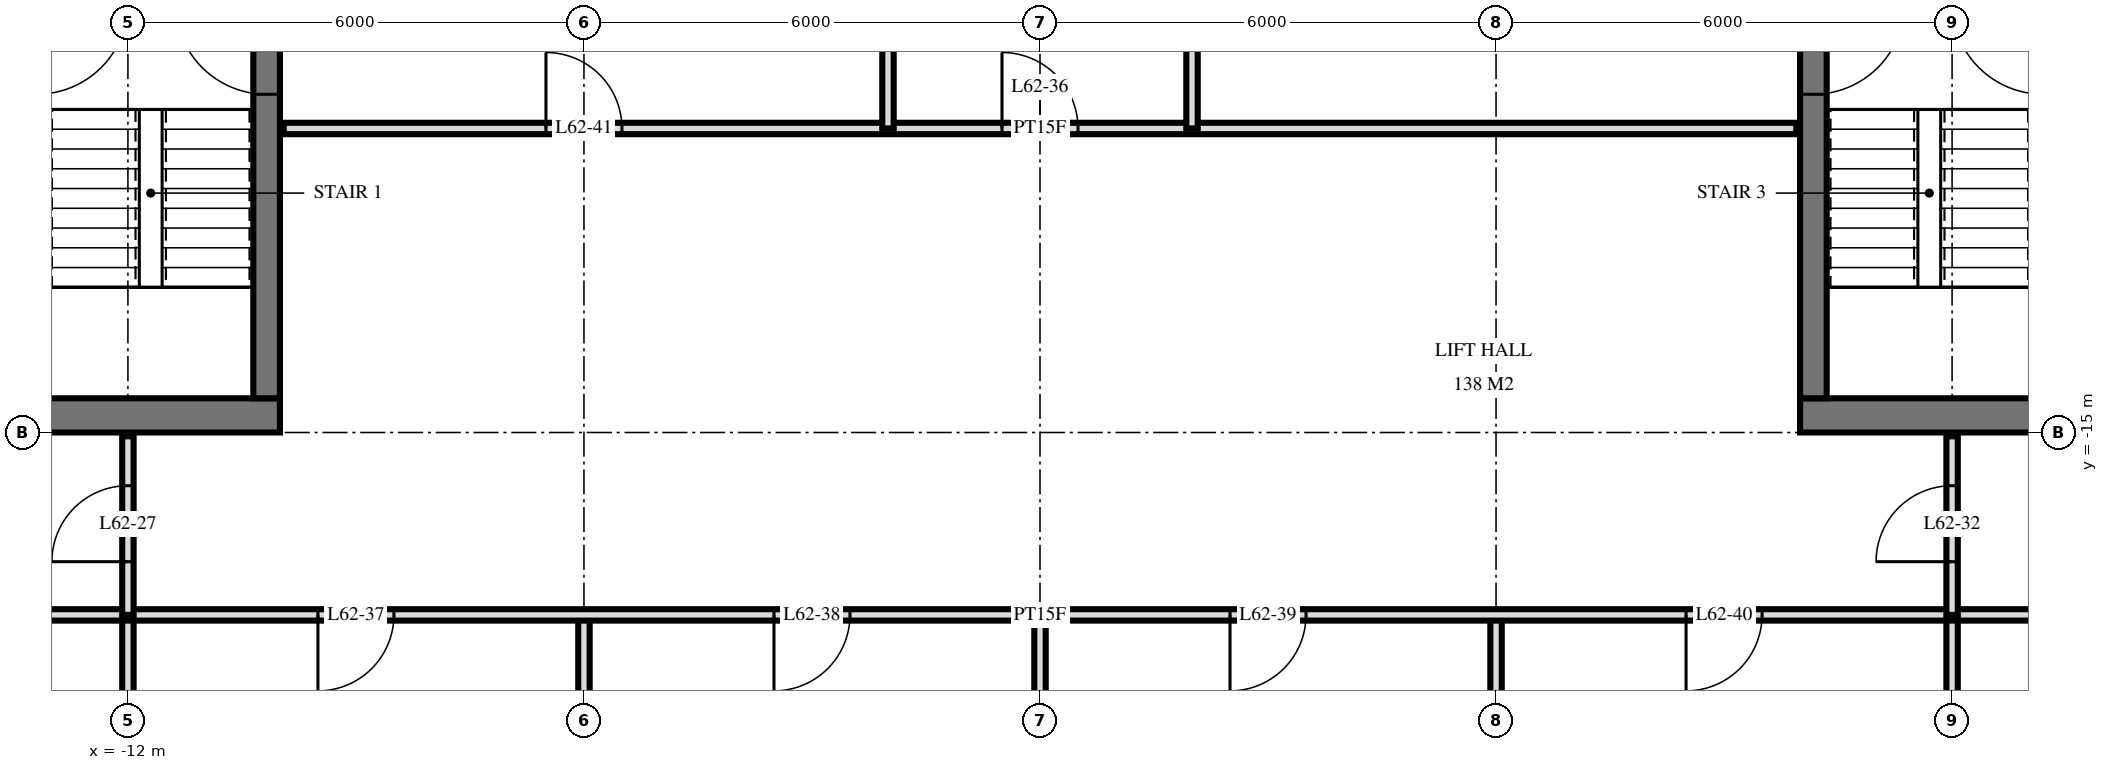
"""IFC4 building model, lengths in metres.
Left out: names, types, materials, properties, quantities, classifications, styles, units other than length and angle.
Written with IfcOpenShell. Run it as: python <this file> out.ifc"""

import sys

from ifc_helpers import new_model, si_unit, direction, frame, frame_2d, origin, place, context, subcontext, project, spatial, rectangle, extrude, element, fill, save


model = new_model("IFC4")
c1 = context("Model", 3, precision=1e-05, world=origin(), true_north=direction((0.0, 1.0)))
c2 = subcontext(c1, "Body", "Model", "MODEL_VIEW")
j1 = project(units=[si_unit("LENGTHUNIT", "METRE"), si_unit("PLANEANGLEUNIT", "RADIAN")], contexts=[c1])
p1 = place(None, origin())
s1 = spatial("IfcSite", under=j1, at=p1, CompositionType="ELEMENT")
p2 = place(p1, origin())
s2 = spatial("IfcBuilding", under=s1, at=p2, CompositionType="ELEMENT")
p3 = place(p2, frame((0.0, 0.0, 236.1)))
s3 = spatial("IfcBuildingStorey", under=s2, at=p3, CompositionType="ELEMENT", Elevation=236.1)
p4 = place(p3, frame((-24.5, -14.775, 0.0), z_axis=(0.0, 0.0, 1.0), x_axis=(1.0, 0.0, 0.0)))
e1 = element("IfcWall", 1, at=p4, inside=s3, PredefinedType="SHEAR", context=c2, shape_type="SweptSolid", body=[
    extrude(rectangle(XDim=14.5, YDim=0.45, at=frame_2d((7.25, 0.0))), origin(), (0.0, 0.0, 1.0), 3.5),
])
p5 = place(p4, frame((6.2, 0.0, 0.0)))
e2 = element("IfcOpeningElement", 2, at=p5, cuts=e1, PredefinedType="OPENING", context=c2, shape_type="SweptSolid", body=[
    extrude(rectangle(XDim=1.2, YDim=2.1, at=frame_2d((0.6, 1.05))), frame((0.0, 0.235, 0.0), z_axis=(0.0, -1.0, 0.0), x_axis=(1.0, 0.0, 0.0)), (0.0, 0.0, 1.0), 0.47),
])
p6 = place(p4, frame((9.25, 0.0, 0.0)))
e3 = element("IfcOpeningElement", 3, at=p6, cuts=e1, PredefinedType="OPENING", context=c2, shape_type="SweptSolid", body=[
    extrude(rectangle(XDim=1.1, YDim=2.1, at=frame_2d((0.55, 1.05))), frame((0.0, 0.235, 0.0), z_axis=(0.0, -1.0, 0.0), x_axis=(1.0, 0.0, 0.0)), (0.0, 0.0, 1.0), 0.47),
])
p7 = place(p4, frame((3.5, 0.0, 0.0)))
e4 = element("IfcOpeningElement", 4, at=p7, cuts=e1, PredefinedType="OPENING", context=c2, shape_type="SweptSolid", body=[
    extrude(rectangle(XDim=0.9, YDim=2.1, at=frame_2d((0.45, 1.05))), frame((0.0, 0.235, 0.0), z_axis=(0.0, -1.0, 0.0), x_axis=(1.0, 0.0, 0.0)), (0.0, 0.0, 1.0), 0.47),
])
p8 = place(p4, frame((1.05, 0.0, 0.0)))
e5 = element("IfcOpeningElement", 5, at=p8, cuts=e1, PredefinedType="OPENING", context=c2, shape_type="SweptSolid", body=[
    extrude(rectangle(XDim=1.0, YDim=2.1, at=frame_2d((0.5, 1.05))), frame((0.0, 0.235, 0.0), z_axis=(0.0, -1.0, 0.0), x_axis=(1.0, 0.0, 0.0)), (0.0, 0.0, 1.0), 0.47),
])
p9 = place(p3, frame((-10.175, -14.55, 0.0), z_axis=(0.0, 0.0, 1.0), x_axis=(0.0, 1.0, 0.0)))
e6 = element("IfcWall", 6, at=p9, inside=s3, PredefinedType="SHEAR", context=c2, shape_type="SweptSolid", body=[
    extrude(rectangle(XDim=14.1, YDim=0.35, at=frame_2d((7.05, 0.0))), origin(), (0.0, 0.0, 1.0), 3.5),
])
p10 = place(p9, frame((8.4, 0.0, 0.0)))
e7 = element("IfcOpeningElement", 7, at=p10, cuts=e6, PredefinedType="OPENING", context=c2, shape_type="SweptSolid", body=[
    extrude(rectangle(XDim=1.4, YDim=2.4, at=frame_2d((0.7, 1.2))), frame((0.0, 0.185, 0.0), z_axis=(0.0, -1.0, 0.0), x_axis=(1.0, 0.0, 0.0)), (0.0, 0.0, 1.0), 0.37),
])
p11 = place(p9, frame((10.0, 0.0, 0.0)))
e8 = element("IfcOpeningElement", 8, at=p11, cuts=e6, PredefinedType="OPENING", context=c2, shape_type="SweptSolid", body=[
    extrude(rectangle(XDim=1.4, YDim=2.4, at=frame_2d((0.7, 1.2))), frame((0.0, 0.185, 0.0), z_axis=(0.0, -1.0, 0.0), x_axis=(1.0, 0.0, 0.0)), (0.0, 0.0, 1.0), 0.37),
])
p12 = place(p9, frame((4.0, 0.0, 0.0)))
e9 = element("IfcOpeningElement", 9, at=p12, cuts=e6, PredefinedType="OPENING", context=c2, shape_type="SweptSolid", body=[
    extrude(rectangle(XDim=1.2, YDim=2.1, at=frame_2d((0.6, 1.05))), frame((0.0, 0.185, 0.0), z_axis=(0.0, -1.0, 0.0), x_axis=(1.0, 0.0, 0.0)), (0.0, 0.0, 1.0), 0.37),
])
p13 = place(p3, frame((10.0, -14.775, 0.0), z_axis=(0.0, 0.0, 1.0), x_axis=(1.0, 0.0, 0.0)))
e10 = element("IfcWall", 10, at=p13, inside=s3, PredefinedType="SHEAR", context=c2, shape_type="SweptSolid", body=[
    extrude(rectangle(XDim=14.5, YDim=0.45, at=frame_2d((7.25, 0.0))), origin(), (0.0, 0.0, 1.0), 3.5),
])
p14 = place(p13, frame((7.1, 0.0, 0.0)))
e11 = element("IfcOpeningElement", 11, at=p14, cuts=e10, PredefinedType="OPENING", context=c2, shape_type="SweptSolid", body=[
    extrude(rectangle(XDim=1.2, YDim=2.1, at=frame_2d((0.6, 1.05))), frame((0.0, 0.235, 0.0), z_axis=(0.0, -1.0, 0.0), x_axis=(1.0, 0.0, 0.0)), (0.0, 0.0, 1.0), 0.47),
])
p15 = place(p13, frame((4.15, 0.0, 0.0)))
e12 = element("IfcOpeningElement", 12, at=p15, cuts=e10, PredefinedType="OPENING", context=c2, shape_type="SweptSolid", body=[
    extrude(rectangle(XDim=1.1, YDim=2.1, at=frame_2d((0.55, 1.05))), frame((0.0, 0.235, 0.0), z_axis=(0.0, -1.0, 0.0), x_axis=(1.0, 0.0, 0.0)), (0.0, 0.0, 1.0), 0.47),
])
p16 = place(p13, frame((10.1, 0.0, 0.0)))
e13 = element("IfcOpeningElement", 13, at=p16, cuts=e10, PredefinedType="OPENING", context=c2, shape_type="SweptSolid", body=[
    extrude(rectangle(XDim=0.9, YDim=2.1, at=frame_2d((0.45, 1.05))), frame((0.0, 0.235, 0.0), z_axis=(0.0, -1.0, 0.0), x_axis=(1.0, 0.0, 0.0)), (0.0, 0.0, 1.0), 0.47),
])
p17 = place(p13, frame((12.45, 0.0, 0.0)))
e14 = element("IfcOpeningElement", 14, at=p17, cuts=e10, PredefinedType="OPENING", context=c2, shape_type="SweptSolid", body=[
    extrude(rectangle(XDim=1.0, YDim=2.1, at=frame_2d((0.5, 1.05))), frame((0.0, 0.235, 0.0), z_axis=(0.0, -1.0, 0.0), x_axis=(1.0, 0.0, 0.0)), (0.0, 0.0, 1.0), 0.47),
])
p18 = place(p3, frame((10.175, -14.55, 0.0), z_axis=(0.0, 0.0, 1.0), x_axis=(0.0, 1.0, 0.0)))
e15 = element("IfcWall", 15, at=p18, inside=s3, PredefinedType="SHEAR", context=c2, shape_type="SweptSolid", body=[
    extrude(rectangle(XDim=14.1, YDim=0.35, at=frame_2d((7.05, 0.0))), origin(), (0.0, 0.0, 1.0), 3.5),
])
p19 = place(p18, frame((8.4, 0.0, 0.0)))
e16 = element("IfcOpeningElement", 16, at=p19, cuts=e15, PredefinedType="OPENING", context=c2, shape_type="SweptSolid", body=[
    extrude(rectangle(XDim=1.4, YDim=2.4, at=frame_2d((0.7, 1.2))), frame((0.0, 0.185, 0.0), z_axis=(0.0, -1.0, 0.0), x_axis=(1.0, 0.0, 0.0)), (0.0, 0.0, 1.0), 0.37),
])
p20 = place(p18, frame((10.0, 0.0, 0.0)))
e17 = element("IfcOpeningElement", 17, at=p20, cuts=e15, PredefinedType="OPENING", context=c2, shape_type="SweptSolid", body=[
    extrude(rectangle(XDim=1.4, YDim=2.4, at=frame_2d((0.7, 1.2))), frame((0.0, 0.185, 0.0), z_axis=(0.0, -1.0, 0.0), x_axis=(1.0, 0.0, 0.0)), (0.0, 0.0, 1.0), 0.37),
])
p21 = place(p18, frame((4.0, 0.0, 0.0)))
e18 = element("IfcOpeningElement", 18, at=p21, cuts=e15, PredefinedType="OPENING", context=c2, shape_type="SweptSolid", body=[
    extrude(rectangle(XDim=1.2, YDim=2.1, at=frame_2d((0.6, 1.05))), frame((0.0, 0.185, 0.0), z_axis=(0.0, -1.0, 0.0), x_axis=(1.0, 0.0, 0.0)), (0.0, 0.0, 1.0), 0.37),
])
p22 = place(p3, frame((12.0, -17.4, 0.0), z_axis=(0.0, 0.0, 1.0), x_axis=(0.0, 1.0, 0.0)))
e19 = element("IfcWall", 19, at=p22, inside=s3, PredefinedType="PARTITIONING", context=c2, shape_type="SweptSolid", body=[
    extrude(rectangle(XDim=2.35, YDim=0.15, at=frame_2d((1.175, 0.0))), origin(), (0.0, 0.0, 1.0), 3.22),
])
p23 = place(p22, frame((0.7, 0.0, 0.0)))
e20 = element("IfcOpeningElement", 20, at=p23, cuts=e19, PredefinedType="OPENING", context=c2, shape_type="SweptSolid", body=[
    extrude(rectangle(XDim=1.0, YDim=2.1, at=frame_2d((0.5, 1.05))), frame((0.0, 0.085, 0.0), z_axis=(0.0, -1.0, 0.0), x_axis=(1.0, 0.0, 0.0)), (0.0, 0.0, 1.0), 0.17),
])
for number, where, z_axis, x_axis in (
    (21, (12.0, -29.22, 0.0), (0.0, 0.0, 1.0), (0.0, 1.0, 0.0)),
    (22, (6.0, -29.22, 0.0), (0.0, 0.0, 1.0), (0.0, 1.0, 0.0)),
):
    element("IfcWall", number, at=place(p3, frame(where, z_axis=z_axis, x_axis=x_axis)), inside=s3, PredefinedType="PARTITIONING", context=c2, shape_type="SweptSolid", body=[
        extrude(rectangle(XDim=11.82, YDim=0.15, at=frame_2d((5.91, 0.0))), origin(), (0.0, 0.0, 1.0), 3.22),
    ])
p24 = place(p3, frame((2.0, -11.0, 0.0), z_axis=(0.0, 0.0, 1.0), x_axis=(0.0, 1.0, 0.0)))
e23 = element("IfcWall", 23, at=p24, inside=s3, PredefinedType="PARTITIONING", context=c2, shape_type="SweptSolid", body=[
    extrude(rectangle(XDim=4.0, YDim=0.15, at=frame_2d((2.0, 0.0))), origin(), (0.0, 0.0, 1.0), 3.22),
])
p25 = place(p3, frame((0.0, -29.22, 0.0), z_axis=(0.0, 0.0, 1.0), x_axis=(0.0, 1.0, 0.0)))
e24 = element("IfcWall", 24, at=p25, inside=s3, PredefinedType="PARTITIONING", context=c2, shape_type="SweptSolid", body=[
    extrude(rectangle(XDim=11.82, YDim=0.15, at=frame_2d((5.91, 0.0))), origin(), (0.0, 0.0, 1.0), 3.22),
])
p26 = place(p3, frame((-2.0, -11.0, 0.0), z_axis=(0.0, 0.0, 1.0), x_axis=(0.0, 1.0, 0.0)))
e25 = element("IfcWall", 25, at=p26, inside=s3, PredefinedType="PARTITIONING", context=c2, shape_type="SweptSolid", body=[
    extrude(rectangle(XDim=4.0, YDim=0.15, at=frame_2d((2.0, 0.0))), origin(), (0.0, 0.0, 1.0), 3.22),
])
p27 = place(p3, frame((-6.0, -29.22, 0.0), z_axis=(0.0, 0.0, 1.0), x_axis=(0.0, 1.0, 0.0)))
e26 = element("IfcWall", 26, at=p27, inside=s3, PredefinedType="PARTITIONING", context=c2, shape_type="SweptSolid", body=[
    extrude(rectangle(XDim=11.82, YDim=0.15, at=frame_2d((5.91, 0.0))), origin(), (0.0, 0.0, 1.0), 3.22),
])
p28 = place(p3, frame((-12.0, -17.4, 0.0), z_axis=(0.0, 0.0, 1.0), x_axis=(0.0, 1.0, 0.0)))
e27 = element("IfcWall", 27, at=p28, inside=s3, PredefinedType="PARTITIONING", context=c2, shape_type="SweptSolid", body=[
    extrude(rectangle(XDim=2.35, YDim=0.15, at=frame_2d((1.175, 0.0))), origin(), (0.0, 0.0, 1.0), 3.22),
])
p29 = place(p28, frame((0.7, 0.0, 0.0)))
e28 = element("IfcOpeningElement", 28, at=p29, cuts=e27, PredefinedType="OPENING", context=c2, shape_type="SweptSolid", body=[
    extrude(rectangle(XDim=1.0, YDim=2.1, at=frame_2d((0.5, 1.05))), frame((0.0, 0.085, 0.0), z_axis=(0.0, -1.0, 0.0), x_axis=(1.0, 0.0, 0.0)), (0.0, 0.0, 1.0), 0.17),
])
p30 = place(p3, frame((-12.0, -29.22, 0.0), z_axis=(0.0, 0.0, 1.0), x_axis=(0.0, 1.0, 0.0)))
e29 = element("IfcWall", 29, at=p30, inside=s3, PredefinedType="PARTITIONING", context=c2, shape_type="SweptSolid", body=[
    extrude(rectangle(XDim=11.82, YDim=0.15, at=frame_2d((5.91, 0.0))), origin(), (0.0, 0.0, 1.0), 3.22),
])
p31 = place(p3, frame((-26.82, -17.4, 0.0), z_axis=(0.0, 0.0, 1.0), x_axis=(1.0, 0.0, 0.0)))
e30 = element("IfcWall", 30, at=p31, inside=s3, PredefinedType="PARTITIONING", context=c2, shape_type="SweptSolid", body=[
    extrude(rectangle(XDim=53.64, YDim=0.15, at=frame_2d((26.82, 0.0))), origin(), (0.0, 0.0, 1.0), 3.22),
])
p32 = place(p31, frame((11.97, 0.0, 0.0)))
e31 = element("IfcOpeningElement", 31, at=p32, cuts=e30, PredefinedType="OPENING", context=c2, shape_type="SweptSolid", body=[
    extrude(rectangle(XDim=1.0, YDim=2.1, at=frame_2d((0.5, 1.05))), frame((0.0, 0.085, 0.0), z_axis=(0.0, -1.0, 0.0), x_axis=(1.0, 0.0, 0.0)), (0.0, 0.0, 1.0), 0.17),
])
p33 = place(p31, frame((3.92, 0.0, 0.0)))
e32 = element("IfcOpeningElement", 32, at=p33, cuts=e30, PredefinedType="OPENING", context=c2, shape_type="SweptSolid", body=[
    extrude(rectangle(XDim=1.0, YDim=2.1, at=frame_2d((0.5, 1.05))), frame((0.0, 0.085, 0.0), z_axis=(0.0, -1.0, 0.0), x_axis=(1.0, 0.0, 0.0)), (0.0, 0.0, 1.0), 0.17),
])
p34 = place(p31, frame((5.72, 0.0, 0.0)))
e33 = element("IfcOpeningElement", 33, at=p34, cuts=e30, PredefinedType="OPENING", context=c2, shape_type="SweptSolid", body=[
    extrude(rectangle(XDim=1.0, YDim=2.1, at=frame_2d((0.5, 1.05))), frame((0.0, 0.085, 0.0), z_axis=(0.0, -1.0, 0.0), x_axis=(1.0, 0.0, 0.0)), (0.0, 0.0, 1.0), 0.17),
])
p35 = place(p31, frame((47.72, 0.0, 0.0)))
e34 = element("IfcOpeningElement", 34, at=p35, cuts=e30, PredefinedType="OPENING", context=c2, shape_type="SweptSolid", body=[
    extrude(rectangle(XDim=1.0, YDim=2.1, at=frame_2d((0.5, 1.05))), frame((0.0, 0.085, 0.0), z_axis=(0.0, -1.0, 0.0), x_axis=(1.0, 0.0, 0.0)), (0.0, 0.0, 1.0), 0.17),
])
p36 = place(p31, frame((51.02, 0.0, 0.0)))
e35 = element("IfcOpeningElement", 35, at=p36, cuts=e30, PredefinedType="OPENING", context=c2, shape_type="SweptSolid", body=[
    extrude(rectangle(XDim=1.0, YDim=2.1, at=frame_2d((0.5, 1.05))), frame((0.0, 0.085, 0.0), z_axis=(0.0, -1.0, 0.0), x_axis=(1.0, 0.0, 0.0)), (0.0, 0.0, 1.0), 0.17),
])
p37 = place(p31, frame((17.32, 0.0, 0.0)))
e36 = element("IfcOpeningElement", 36, at=p37, cuts=e30, PredefinedType="OPENING", context=c2, shape_type="SweptSolid", body=[
    extrude(rectangle(XDim=1.0, YDim=2.1, at=frame_2d((0.5, 1.05))), frame((0.0, 0.085, 0.0), z_axis=(0.0, -1.0, 0.0), x_axis=(1.0, 0.0, 0.0)), (0.0, 0.0, 1.0), 0.17),
])
p38 = place(p31, frame((23.32, 0.0, 0.0)))
e37 = element("IfcOpeningElement", 37, at=p38, cuts=e30, PredefinedType="OPENING", context=c2, shape_type="SweptSolid", body=[
    extrude(rectangle(XDim=1.0, YDim=2.1, at=frame_2d((0.5, 1.05))), frame((0.0, 0.085, 0.0), z_axis=(0.0, -1.0, 0.0), x_axis=(1.0, 0.0, 0.0)), (0.0, 0.0, 1.0), 0.17),
])
p39 = place(p31, frame((29.32, 0.0, 0.0)))
e38 = element("IfcOpeningElement", 38, at=p39, cuts=e30, PredefinedType="OPENING", context=c2, shape_type="SweptSolid", body=[
    extrude(rectangle(XDim=1.0, YDim=2.1, at=frame_2d((0.5, 1.05))), frame((0.0, 0.085, 0.0), z_axis=(0.0, -1.0, 0.0), x_axis=(1.0, 0.0, 0.0)), (0.0, 0.0, 1.0), 0.17),
])
p40 = place(p31, frame((35.32, 0.0, 0.0)))
e39 = element("IfcOpeningElement", 39, at=p40, cuts=e30, PredefinedType="OPENING", context=c2, shape_type="SweptSolid", body=[
    extrude(rectangle(XDim=1.0, YDim=2.1, at=frame_2d((0.5, 1.05))), frame((0.0, 0.085, 0.0), z_axis=(0.0, -1.0, 0.0), x_axis=(1.0, 0.0, 0.0)), (0.0, 0.0, 1.0), 0.17),
])
p41 = place(p3, frame((-9.95, -11.0, 0.0), z_axis=(0.0, 0.0, 1.0), x_axis=(1.0, 0.0, 0.0)))
e40 = element("IfcWall", 40, at=p41, inside=s3, PredefinedType="PARTITIONING", context=c2, shape_type="SweptSolid", body=[
    extrude(rectangle(XDim=19.9, YDim=0.15, at=frame_2d((9.95, 0.0))), origin(), (0.0, 0.0, 1.0), 3.22),
])
p42 = place(p41, frame((9.45, 0.0, 0.0)))
e41 = element("IfcOpeningElement", 41, at=p42, cuts=e40, PredefinedType="OPENING", context=c2, shape_type="SweptSolid", body=[
    extrude(rectangle(XDim=1.0, YDim=2.1, at=frame_2d((0.5, 1.05))), frame((0.0, 0.085, 0.0), z_axis=(0.0, -1.0, 0.0), x_axis=(1.0, 0.0, 0.0)), (0.0, 0.0, 1.0), 0.17),
])
p43 = place(p41, frame((3.45, 0.0, 0.0)))
e42 = element("IfcOpeningElement", 42, at=p43, cuts=e40, PredefinedType="OPENING", context=c2, shape_type="SweptSolid", body=[
    extrude(rectangle(XDim=1.0, YDim=2.1, at=frame_2d((0.5, 1.05))), frame((0.0, 0.085, 0.0), z_axis=(0.0, -1.0, 0.0), x_axis=(1.0, 0.0, 0.0)), (0.0, 0.0, 1.0), 0.17),
])
p44 = place(p12, origin())
e43 = element("IfcDoor", 43, at=p44, inside=s3, OperationType="SINGLE_SWING_LEFT", PredefinedType="DOOR", context=c2, shape_type="SweptSolid", body=[
    extrude(rectangle(XDim=1.2, YDim=2.1, at=frame_2d((0.6, 1.05))), frame((0.0, 0.025, 0.0), z_axis=(0.0, -1.0, 0.0), x_axis=(1.0, 0.0, 0.0)), (0.0, 0.0, 1.0), 0.05),
])
fill(e9, e43)
p45 = place(p21, frame((0.6, 0.0, 0.0), z_axis=(0.0, 0.0, 1.0), x_axis=(-1.0, 0.0, 0.0)))
e44 = element("IfcDoor", 44, at=p45, inside=s3, OperationType="SINGLE_SWING_RIGHT", PredefinedType="DOOR", context=c2, shape_type="SweptSolid", body=[
    extrude(rectangle(XDim=1.2, YDim=2.1, at=frame_2d((0.0, 1.05))), frame((0.0, -0.025, 0.0), z_axis=(0.0, 1.0, 0.0), x_axis=(-1.0, 0.0, 0.0)), (0.0, 0.0, 1.0), 0.05),
])
fill(e18, e44)
p46 = place(p29, origin())
e45 = element("IfcDoor", 45, at=p46, inside=s3, OperationType="SINGLE_SWING_RIGHT", PredefinedType="DOOR", context=c2, shape_type="SweptSolid", body=[
    extrude(rectangle(XDim=1.0, YDim=2.1, at=frame_2d((0.5, 1.05))), frame((0.0, 0.025, 0.0), z_axis=(0.0, -1.0, 0.0), x_axis=(1.0, 0.0, 0.0)), (0.0, 0.0, 1.0), 0.05),
])
fill(e28, e45)
p47 = place(p23, origin())
e46 = element("IfcDoor", 46, at=p47, inside=s3, OperationType="SINGLE_SWING_RIGHT", PredefinedType="DOOR", context=c2, shape_type="SweptSolid", body=[
    extrude(rectangle(XDim=1.0, YDim=2.1, at=frame_2d((0.5, 1.05))), frame((0.0, 0.025, 0.0), z_axis=(0.0, -1.0, 0.0), x_axis=(1.0, 0.0, 0.0)), (0.0, 0.0, 1.0), 0.05),
])
fill(e20, e46)
p48 = place(p42, origin())
e47 = element("IfcDoor", 47, at=p48, inside=s3, OperationType="SINGLE_SWING_RIGHT", PredefinedType="DOOR", context=c2, shape_type="SweptSolid", body=[
    extrude(rectangle(XDim=1.0, YDim=2.1, at=frame_2d((0.5, 1.05))), frame((0.0, 0.025, 0.0), z_axis=(0.0, -1.0, 0.0), x_axis=(1.0, 0.0, 0.0)), (0.0, 0.0, 1.0), 0.05),
])
fill(e41, e47)
p49 = place(p37, frame((0.5, 0.0, 0.0), z_axis=(0.0, 0.0, 1.0), x_axis=(-1.0, 0.0, 0.0)))
e48 = element("IfcDoor", 48, at=p49, inside=s3, OperationType="SINGLE_SWING_LEFT", PredefinedType="DOOR", context=c2, shape_type="SweptSolid", body=[
    extrude(rectangle(XDim=1.0, YDim=2.1, at=frame_2d((0.0, 1.05))), frame((0.0, -0.025, 0.0), z_axis=(0.0, 1.0, 0.0), x_axis=(-1.0, 0.0, 0.0)), (0.0, 0.0, 1.0), 0.05),
])
fill(e36, e48)
p50 = place(p38, frame((0.5, 0.0, 0.0), z_axis=(0.0, 0.0, 1.0), x_axis=(-1.0, 0.0, 0.0)))
e49 = element("IfcDoor", 49, at=p50, inside=s3, OperationType="SINGLE_SWING_LEFT", PredefinedType="DOOR", context=c2, shape_type="SweptSolid", body=[
    extrude(rectangle(XDim=1.0, YDim=2.1, at=frame_2d((0.0, 1.05))), frame((0.0, -0.025, 0.0), z_axis=(0.0, 1.0, 0.0), x_axis=(-1.0, 0.0, 0.0)), (0.0, 0.0, 1.0), 0.05),
])
fill(e37, e49)
p51 = place(p39, frame((0.5, 0.0, 0.0), z_axis=(0.0, 0.0, 1.0), x_axis=(-1.0, 0.0, 0.0)))
e50 = element("IfcDoor", 50, at=p51, inside=s3, OperationType="SINGLE_SWING_LEFT", PredefinedType="DOOR", context=c2, shape_type="SweptSolid", body=[
    extrude(rectangle(XDim=1.0, YDim=2.1, at=frame_2d((0.0, 1.05))), frame((0.0, -0.025, 0.0), z_axis=(0.0, 1.0, 0.0), x_axis=(-1.0, 0.0, 0.0)), (0.0, 0.0, 1.0), 0.05),
])
fill(e38, e50)
p52 = place(p40, frame((0.5, 0.0, 0.0), z_axis=(0.0, 0.0, 1.0), x_axis=(-1.0, 0.0, 0.0)))
e51 = element("IfcDoor", 51, at=p52, inside=s3, OperationType="SINGLE_SWING_LEFT", PredefinedType="DOOR", context=c2, shape_type="SweptSolid", body=[
    extrude(rectangle(XDim=1.0, YDim=2.1, at=frame_2d((0.0, 1.05))), frame((0.0, -0.025, 0.0), z_axis=(0.0, 1.0, 0.0), x_axis=(-1.0, 0.0, 0.0)), (0.0, 0.0, 1.0), 0.05),
])
fill(e39, e51)
p53 = place(p43, origin())
e52 = element("IfcDoor", 52, at=p53, inside=s3, OperationType="SINGLE_SWING_RIGHT", PredefinedType="DOOR", context=c2, shape_type="SweptSolid", body=[
    extrude(rectangle(XDim=1.0, YDim=2.1, at=frame_2d((0.5, 1.05))), frame((0.0, 0.025, 0.0), z_axis=(0.0, -1.0, 0.0), x_axis=(1.0, 0.0, 0.0)), (0.0, 0.0, 1.0), 0.05),
])
fill(e42, e52)
save(model, sys.argv[1])
